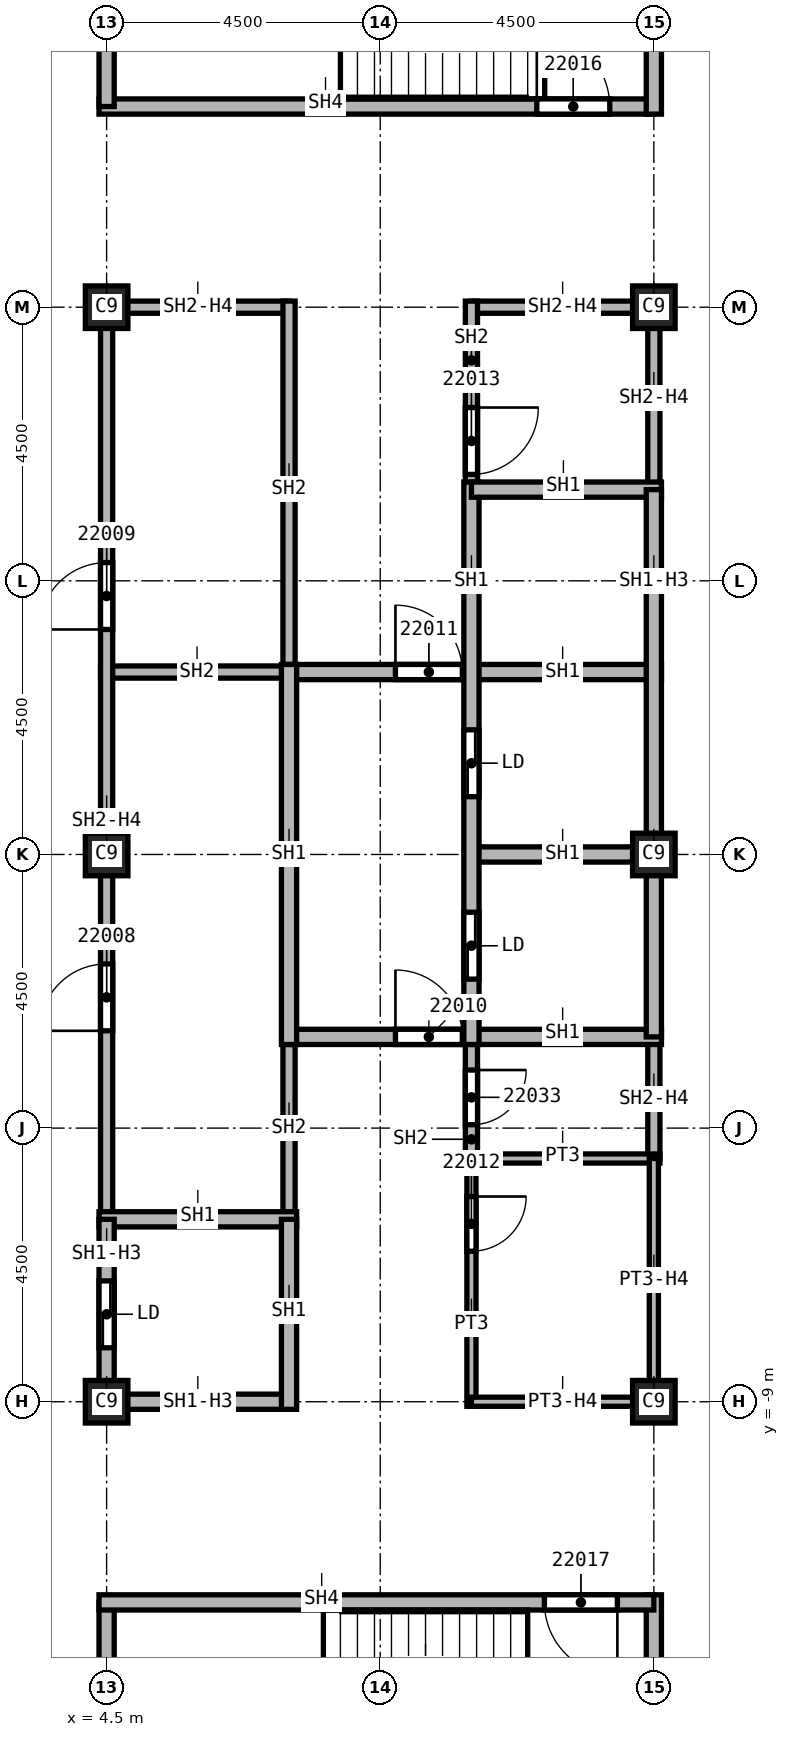
"""IFC4 building model, lengths in metres.
Left out: names, types, materials, properties, quantities, classifications, styles, units other than length and angle.
Written with IfcOpenShell. Run it as: python <this file> out.ifc"""

import sys

from ifc_helpers import new_model, si_unit, direction, frame, frame_2d, origin, origin_2d, place, context, subcontext, project, spatial, rectangle, extrude, element, fill, save


model = new_model("IFC4")
c1 = context("Model", 3, precision=1e-05, world=origin(), true_north=direction((0.0, 1.0)))
c2 = subcontext(c1, "Body", "Model", "MODEL_VIEW")
j1 = project(units=[si_unit("LENGTHUNIT", "METRE"), si_unit("PLANEANGLEUNIT", "RADIAN")], contexts=[c1])
p1 = place(None, origin())
s1 = spatial("IfcSite", under=j1, at=p1, CompositionType="ELEMENT")
p2 = place(p1, origin())
s2 = spatial("IfcBuilding", under=s1, at=p2, CompositionType="ELEMENT")
p3 = place(p2, frame((0.0, 0.0, 312.0)))
s3 = spatial("IfcBuildingStorey", under=s2, at=p3, CompositionType="ELEMENT", Elevation=312.0)
for number, where, z_axis, x_axis in (
    (1, (4.5, 0.0, 0.0), (0.0, 0.0, 1.0), (1.0, 0.0, 0.0)),
    (2, (4.5, 9.0, 0.0), (0.0, 0.0, 1.0), (1.0, 0.0, 0.0)),
    (3, (4.5, -9.0, 0.0), (0.0, 0.0, 1.0), (1.0, 0.0, 0.0)),
    (4, (13.5, 0.0, 0.0), (0.0, 0.0, 1.0), (1.0, 0.0, 0.0)),
    (5, (13.5, 9.0, 0.0), (0.0, 0.0, 1.0), (1.0, 0.0, 0.0)),
    (6, (13.5, -9.0, 0.0), (0.0, 0.0, 1.0), (1.0, 0.0, 0.0)),
):
    element("IfcColumn", number, at=place(p3, frame(where, z_axis=z_axis, x_axis=x_axis)), inside=s3, PredefinedType="COLUMN", context=c2, shape_type="SweptSolid", body=[
        extrude(rectangle(XDim=0.7, YDim=0.7, at=origin_2d()), origin(), (0.0, 0.0, 1.0), 3.74),
    ])
p4 = place(p3, frame((4.4, 3.0, 0.0), z_axis=(0.0, 0.0, 1.0), x_axis=(1.0, 0.0, 0.0)))
e7 = element("IfcWall", 7, at=p4, inside=s3, PredefinedType="SOLIDWALL", context=c2, shape_type="SweptSolid", body=[
    extrude(rectangle(XDim=3.225, YDim=0.2, at=frame_2d((1.613, 0.0))), origin(), (0.0, 0.0, 1.0), 3.74),
])
p5 = place(p3, frame((4.5, -6.0, 0.0), z_axis=(0.0, 0.0, 1.0), x_axis=(0.0, 1.0, 0.0)))
e8 = element("IfcWall", 8, at=p5, inside=s3, PredefinedType="SOLIDWALL", context=c2, shape_type="SweptSolid", body=[
    extrude(rectangle(XDim=15.1, YDim=0.2, at=frame_2d((7.55, 0.0))), origin(), (0.0, 0.0, 1.0), 3.062),
])
p6 = place(p5, frame((3.1, 0.0, 0.0)))
e9 = element("IfcOpeningElement", 9, at=p6, cuts=e8, PredefinedType="OPENING", context=c2, shape_type="SweptSolid", body=[
    extrude(rectangle(XDim=1.1, YDim=2.1, at=frame_2d((0.55, 1.05))), frame((0.0, 0.1, 0.0), z_axis=(0.0, -1.0, 0.0), x_axis=(1.0, 0.0, 0.0)), (0.0, 0.0, 1.0), 0.2),
])
p7 = place(p5, frame((9.7, 0.0, 0.0)))
e10 = element("IfcOpeningElement", 10, at=p7, cuts=e8, PredefinedType="OPENING", context=c2, shape_type="SweptSolid", body=[
    extrude(rectangle(XDim=1.1, YDim=2.1, at=frame_2d((0.55, 1.05))), frame((0.0, 0.1, 0.0), z_axis=(0.0, -1.0, 0.0), x_axis=(1.0, 0.0, 0.0)), (0.0, 0.0, 1.0), 0.2),
])
p8 = place(p3, frame((4.5, 9.0, 0.0), z_axis=(0.0, 0.0, 1.0), x_axis=(1.0, 0.0, 0.0)))
e11 = element("IfcWall", 11, at=p8, inside=s3, PredefinedType="SOLIDWALL", context=c2, shape_type="SweptSolid", body=[
    extrude(rectangle(XDim=3.0, YDim=0.2, at=frame_2d((1.5, 0.0))), origin(), (0.0, 0.0, 1.0), 3.062),
])
p9 = place(p3, frame((7.5, -2.875, 0.0), z_axis=(0.0, 0.0, 1.0), x_axis=(0.0, -1.0, 0.0)))
e12 = element("IfcWall", 12, at=p9, inside=s3, PredefinedType="SOLIDWALL", context=c2, shape_type="SweptSolid", body=[
    extrude(rectangle(XDim=3.125, YDim=0.2, at=frame_2d((1.562, 0.0))), origin(), (0.0, 0.0, 1.0), 3.74),
])
p10 = place(p3, frame((7.5, 9.1, 0.0), z_axis=(0.0, 0.0, 1.0), x_axis=(0.0, -1.0, 0.0)))
e13 = element("IfcWall", 13, at=p10, inside=s3, PredefinedType="SOLIDWALL", context=c2, shape_type="SweptSolid", body=[
    extrude(rectangle(XDim=6.225, YDim=0.2, at=frame_2d((3.113, 0.0))), origin(), (0.0, 0.0, 1.0), 3.74),
])
p11 = place(p3, frame((10.5, -2.875, 0.0), z_axis=(0.0, 0.0, 1.0), x_axis=(0.0, -1.0, 0.0)))
e14 = element("IfcWall", 14, at=p11, inside=s3, PredefinedType="SOLIDWALL", context=c2, shape_type="SweptSolid", body=[
    extrude(rectangle(XDim=2.2, YDim=0.2, at=frame_2d((1.1, 0.0))), origin(), (0.0, 0.0, 1.0), 3.74),
])
p12 = place(p11, frame((0.67, 0.0, 0.0)))
e15 = element("IfcOpeningElement", 15, at=p12, cuts=e14, PredefinedType="OPENING", context=c2, shape_type="SweptSolid", body=[
    extrude(rectangle(XDim=0.9, YDim=2.1, at=frame_2d((0.45, 1.05))), frame((0.0, 0.1, 0.0), z_axis=(0.0, -1.0, 0.0), x_axis=(1.0, 0.0, 0.0)), (0.0, 0.0, 1.0), 0.2),
])
p13 = place(p3, frame((10.5, 9.0, 0.0), z_axis=(0.0, 0.0, 1.0), x_axis=(1.0, 0.0, 0.0)))
e16 = element("IfcWall", 16, at=p13, inside=s3, PredefinedType="SOLIDWALL", context=c2, shape_type="SweptSolid", body=[
    extrude(rectangle(XDim=3.0, YDim=0.2, at=frame_2d((1.5, 0.0))), origin(), (0.0, 0.0, 1.0), 3.062),
])
p14 = place(p3, frame((10.5, 9.1, 0.0), z_axis=(0.0, 0.0, 1.0), x_axis=(0.0, -1.0, 0.0)))
e17 = element("IfcWall", 17, at=p14, inside=s3, PredefinedType="SOLIDWALL", context=c2, shape_type="SweptSolid", body=[
    extrude(rectangle(XDim=3.225, YDim=0.2, at=frame_2d((1.613, 0.0))), origin(), (0.0, 0.0, 1.0), 3.74),
])
p15 = place(p14, frame((1.75, 0.0, 0.0)))
e18 = element("IfcOpeningElement", 18, at=p15, cuts=e17, PredefinedType="OPENING", context=c2, shape_type="SweptSolid", body=[
    extrude(rectangle(XDim=1.1, YDim=2.1, at=frame_2d((0.55, 1.05))), frame((0.0, 0.1, 0.0), z_axis=(0.0, -1.0, 0.0), x_axis=(1.0, 0.0, 0.0)), (0.0, 0.0, 1.0), 0.2),
])
p16 = place(p3, frame((13.5, -3.0, 0.0), z_axis=(0.0, 0.0, 1.0), x_axis=(0.0, -1.0, 0.0)))
e19 = element("IfcWall", 19, at=p16, inside=s3, PredefinedType="SOLIDWALL", context=c2, shape_type="SweptSolid", body=[
    extrude(rectangle(XDim=2.0, YDim=0.2, at=frame_2d((1.0, 0.0))), origin(), (0.0, 0.0, 1.0), 3.062),
])
p17 = place(p3, frame((13.5, 9.1, 0.0), z_axis=(0.0, 0.0, 1.0), x_axis=(0.0, -1.0, 0.0)))
e20 = element("IfcWall", 20, at=p17, inside=s3, PredefinedType="SOLIDWALL", context=c2, shape_type="SweptSolid", body=[
    extrude(rectangle(XDim=3.1, YDim=0.2, at=frame_2d((1.55, 0.0))), origin(), (0.0, 0.0, 1.0), 3.062),
])
p18 = place(p3, frame((4.375, -6.0, 0.0), z_axis=(0.0, 0.0, 1.0), x_axis=(1.0, 0.0, 0.0)))
e21 = element("IfcWall", 21, at=p18, inside=s3, PredefinedType="SOLIDWALL", context=c2, shape_type="SweptSolid", body=[
    extrude(rectangle(XDim=3.25, YDim=0.25, at=frame_2d((1.625, 0.0))), origin(), (0.0, 0.0, 1.0), 3.74),
])
p19 = place(p3, frame((4.5, -9.125, 0.0), z_axis=(0.0, 0.0, 1.0), x_axis=(0.0, 1.0, 0.0)))
e22 = element("IfcWall", 22, at=p19, inside=s3, PredefinedType="SOLIDWALL", context=c2, shape_type="SweptSolid", body=[
    extrude(rectangle(XDim=3.125, YDim=0.25, at=frame_2d((1.562, 0.0))), origin(), (0.0, 0.0, 1.0), 3.062),
])
p20 = place(p19, frame((1.012, 0.0, 0.0)))
e23 = element("IfcOpeningElement", 23, at=p20, cuts=e22, PredefinedType="OPENING", context=c2, shape_type="SweptSolid", body=[
    extrude(rectangle(XDim=1.1, YDim=2.1, at=frame_2d((0.55, 1.05))), frame((0.0, 0.125, 0.0), z_axis=(0.0, -1.0, 0.0), x_axis=(1.0, 0.0, 0.0)), (0.0, 0.0, 1.0), 0.25),
])
p21 = place(p3, frame((7.5, -9.0, 0.0), z_axis=(0.0, 0.0, 1.0), x_axis=(-1.0, 0.0, 0.0)))
e24 = element("IfcWall", 24, at=p21, inside=s3, PredefinedType="SOLIDWALL", context=c2, shape_type="SweptSolid", body=[
    extrude(rectangle(XDim=3.0, YDim=0.25, at=frame_2d((1.5, 0.0))), origin(), (0.0, 0.0, 1.0), 3.062),
])
p22 = place(p3, frame((7.5, -6.0, 0.0), z_axis=(0.0, 0.0, 1.0), x_axis=(0.0, -1.0, 0.0)))
e25 = element("IfcWall", 25, at=p22, inside=s3, PredefinedType="SOLIDWALL", context=c2, shape_type="SweptSolid", body=[
    extrude(rectangle(XDim=3.125, YDim=0.25, at=frame_2d((1.562, 0.0))), origin(), (0.0, 0.0, 1.0), 3.74),
])
p23 = place(p3, frame((7.5, -3.0, 0.0), z_axis=(0.0, 0.0, 1.0), x_axis=(1.0, 0.0, 0.0)))
e26 = element("IfcWall", 26, at=p23, inside=s3, PredefinedType="SOLIDWALL", context=c2, shape_type="SweptSolid", body=[
    extrude(rectangle(XDim=6.125, YDim=0.25, at=frame_2d((3.062, 0.0))), origin(), (0.0, 0.0, 1.0), 3.74),
])
p24 = place(p23, frame((1.75, 0.0, 0.0)))
e27 = element("IfcOpeningElement", 27, at=p24, cuts=e26, PredefinedType="OPENING", context=c2, shape_type="SweptSolid", body=[
    extrude(rectangle(XDim=1.1, YDim=2.1, at=frame_2d((0.55, 1.05))), frame((0.0, 0.125, 0.0), z_axis=(0.0, -1.0, 0.0), x_axis=(1.0, 0.0, 0.0)), (0.0, 0.0, 1.0), 0.25),
])
p25 = place(p3, frame((7.5, 3.0, 0.0), z_axis=(0.0, 0.0, 1.0), x_axis=(1.0, 0.0, 0.0)))
e28 = element("IfcWall", 28, at=p25, inside=s3, PredefinedType="SOLIDWALL", context=c2, shape_type="SweptSolid", body=[
    extrude(rectangle(XDim=6.125, YDim=0.25, at=frame_2d((3.062, 0.0))), origin(), (0.0, 0.0, 1.0), 3.74),
])
p26 = place(p25, frame((1.75, 0.0, 0.0)))
e29 = element("IfcOpeningElement", 29, at=p26, cuts=e28, PredefinedType="OPENING", context=c2, shape_type="SweptSolid", body=[
    extrude(rectangle(XDim=1.1, YDim=2.1, at=frame_2d((0.55, 1.05))), frame((0.0, 0.125, 0.0), z_axis=(0.0, -1.0, 0.0), x_axis=(1.0, 0.0, 0.0)), (0.0, 0.0, 1.0), 0.25),
])
p27 = place(p3, frame((7.5, 3.125, 0.0), z_axis=(0.0, 0.0, 1.0), x_axis=(0.0, -1.0, 0.0)))
e30 = element("IfcWall", 30, at=p27, inside=s3, PredefinedType="SOLIDWALL", context=c2, shape_type="SweptSolid", body=[
    extrude(rectangle(XDim=6.25, YDim=0.25, at=frame_2d((3.125, 0.0))), origin(), (0.0, 0.0, 1.0), 3.74),
])
p28 = place(p3, frame((10.5, 0.0, 0.0), z_axis=(0.0, 0.0, 1.0), x_axis=(1.0, 0.0, 0.0)))
e31 = element("IfcWall", 31, at=p28, inside=s3, PredefinedType="SOLIDWALL", context=c2, shape_type="SweptSolid", body=[
    extrude(rectangle(XDim=3.125, YDim=0.25, at=frame_2d((1.562, 0.0))), origin(), (0.0, 0.0, 1.0), 3.74),
])
p29 = place(p3, frame((10.5, 6.125, 0.0), z_axis=(0.0, 0.0, 1.0), x_axis=(0.0, -1.0, 0.0)))
e32 = element("IfcWall", 32, at=p29, inside=s3, PredefinedType="SOLIDWALL", context=c2, shape_type="SweptSolid", body=[
    extrude(rectangle(XDim=9.25, YDim=0.25, at=frame_2d((4.625, 0.0))), origin(), (0.0, 0.0, 1.0), 3.74),
])
p30 = place(p29, frame((7.075, 0.0, 0.0)))
e33 = element("IfcOpeningElement", 33, at=p30, cuts=e32, PredefinedType="OPENING", context=c2, shape_type="SweptSolid", body=[
    extrude(rectangle(XDim=1.1, YDim=2.1, at=frame_2d((0.55, 1.05))), frame((0.0, 0.125, 0.0), z_axis=(0.0, -1.0, 0.0), x_axis=(1.0, 0.0, 0.0)), (0.0, 0.0, 1.0), 0.25),
])
p31 = place(p29, frame((4.075, 0.0, 0.0)))
e34 = element("IfcOpeningElement", 34, at=p31, cuts=e32, PredefinedType="OPENING", context=c2, shape_type="SweptSolid", body=[
    extrude(rectangle(XDim=1.1, YDim=2.1, at=frame_2d((0.55, 1.05))), frame((0.0, 0.125, 0.0), z_axis=(0.0, -1.0, 0.0), x_axis=(1.0, 0.0, 0.0)), (0.0, 0.0, 1.0), 0.25),
])
p32 = place(p3, frame((10.5, 6.0, 0.0), z_axis=(0.0, 0.0, 1.0), x_axis=(1.0, 0.0, 0.0)))
e35 = element("IfcWall", 35, at=p32, inside=s3, PredefinedType="SOLIDWALL", context=c2, shape_type="SweptSolid", body=[
    extrude(rectangle(XDim=3.125, YDim=0.25, at=frame_2d((1.562, 0.0))), origin(), (0.0, 0.0, 1.0), 3.74),
])
p33 = place(p3, frame((13.5, 6.0, 0.0), z_axis=(0.0, 0.0, 1.0), x_axis=(0.0, -1.0, 0.0)))
e36 = element("IfcWall", 36, at=p33, inside=s3, PredefinedType="SOLIDWALL", context=c2, shape_type="SweptSolid", body=[
    extrude(rectangle(XDim=9.0, YDim=0.25, at=frame_2d((4.5, 0.0))), origin(), (0.0, 0.0, 1.0), 3.062),
])
p34 = place(p3, frame((4.375, 12.3, 0.0), z_axis=(0.0, 0.0, 1.0), x_axis=(1.0, 0.0, 0.0)))
e37 = element("IfcWall", 37, at=p34, inside=s3, PredefinedType="SOLIDWALL", context=c2, shape_type="SweptSolid", body=[
    extrude(rectangle(XDim=9.125, YDim=0.25, at=frame_2d((4.562, 0.0))), origin(), (0.0, 0.0, 1.0), 3.74),
])
p35 = place(p34, frame((7.2, 0.0, 0.0)))
e38 = element("IfcOpeningElement", 38, at=p35, cuts=e37, PredefinedType="OPENING", context=c2, shape_type="SweptSolid", body=[
    extrude(rectangle(XDim=1.2, YDim=2.1, at=frame_2d((0.6, 1.05))), frame((0.0, 0.125, 0.0), z_axis=(0.0, -1.0, 0.0), x_axis=(1.0, 0.0, 0.0)), (0.0, 0.0, 1.0), 0.25),
])
for number, where, z_axis, x_axis in (
    (39, (4.5, -16.8, 0.0), (0.0, 0.0, 1.0), (0.0, 1.0, 0.0)),
    (40, (4.5, 12.3, 0.0), (0.0, 0.0, 1.0), (0.0, 1.0, 0.0)),
):
    element("IfcWall", number, at=place(p3, frame(where, z_axis=z_axis, x_axis=x_axis)), inside=s3, PredefinedType="SOLIDWALL", context=c2, shape_type="SweptSolid", body=[
        extrude(rectangle(XDim=4.5, YDim=0.25, at=frame_2d((2.25, 0.0))), origin(), (0.0, 0.0, 1.0), 3.74),
    ])
p36 = place(p3, frame((13.5, -16.925, 0.0), z_axis=(0.0, 0.0, 1.0), x_axis=(0.0, 1.0, 0.0)))
e41 = element("IfcWall", 41, at=p36, inside=s3, PredefinedType="SOLIDWALL", context=c2, shape_type="SweptSolid", body=[
    extrude(rectangle(XDim=4.75, YDim=0.25, at=frame_2d((2.375, 0.0))), origin(), (0.0, 0.0, 1.0), 3.74),
])
p37 = place(p3, frame((13.5, -12.3, 0.0), z_axis=(0.0, 0.0, 1.0), x_axis=(-1.0, 0.0, 0.0)))
e42 = element("IfcWall", 42, at=p37, inside=s3, PredefinedType="SOLIDWALL", context=c2, shape_type="SweptSolid", body=[
    extrude(rectangle(XDim=9.125, YDim=0.25, at=frame_2d((4.562, 0.0))), origin(), (0.0, 0.0, 1.0), 3.74),
])
p38 = place(p37, frame((0.6, 0.0, 0.0)))
e43 = element("IfcOpeningElement", 43, at=p38, cuts=e42, PredefinedType="OPENING", context=c2, shape_type="SweptSolid", body=[
    extrude(rectangle(XDim=1.2, YDim=2.1, at=frame_2d((0.6, 1.05))), frame((0.0, 0.125, 0.0), z_axis=(0.0, -1.0, 0.0), x_axis=(1.0, 0.0, 0.0)), (0.0, 0.0, 1.0), 0.25),
])
p39 = place(p3, frame((13.5, 12.175, 0.0), z_axis=(0.0, 0.0, 1.0), x_axis=(0.0, 1.0, 0.0)))
e44 = element("IfcWall", 44, at=p39, inside=s3, PredefinedType="SOLIDWALL", context=c2, shape_type="SweptSolid", body=[
    extrude(rectangle(XDim=4.75, YDim=0.25, at=frame_2d((2.375, 0.0))), origin(), (0.0, 0.0, 1.0), 3.74),
])
p40 = place(p3, frame((10.5, -5.0, 0.0), z_axis=(0.0, 0.0, 1.0), x_axis=(1.0, 0.0, 0.0)))
e45 = element("IfcWall", 45, at=p40, inside=s3, PredefinedType="PARTITIONING", context=c2, shape_type="SweptSolid", body=[
    extrude(rectangle(XDim=3.1, YDim=0.15, at=frame_2d((1.55, 0.0))), origin(), (0.0, 0.0, 1.0), 3.74),
])
p41 = place(p3, frame((10.5, -4.925, 0.0), z_axis=(0.0, 0.0, 1.0), x_axis=(0.0, -1.0, 0.0)))
e46 = element("IfcWall", 46, at=p41, inside=s3, PredefinedType="PARTITIONING", context=c2, shape_type="SweptSolid", body=[
    extrude(rectangle(XDim=4.15, YDim=0.15, at=frame_2d((2.075, 0.0))), origin(), (0.0, 0.0, 1.0), 3.74),
])
p42 = place(p41, frame((0.7, 0.0, 0.0)))
e47 = element("IfcOpeningElement", 47, at=p42, cuts=e46, PredefinedType="OPENING", context=c2, shape_type="SweptSolid", body=[
    extrude(rectangle(XDim=0.9, YDim=2.1, at=frame_2d((0.45, 1.05))), frame((0.0, 0.075, 0.0), z_axis=(0.0, -1.0, 0.0), x_axis=(1.0, 0.0, 0.0)), (0.0, 0.0, 1.0), 0.15),
])
p43 = place(p3, frame((13.5, -9.0, 0.0), z_axis=(0.0, 0.0, 1.0), x_axis=(-1.0, 0.0, 0.0)))
e48 = element("IfcWall", 48, at=p43, inside=s3, PredefinedType="PARTITIONING", context=c2, shape_type="SweptSolid", body=[
    extrude(rectangle(XDim=3.0, YDim=0.15, at=frame_2d((1.5, 0.0))), origin(), (0.0, 0.0, 1.0), 3.062),
])
p44 = place(p3, frame((13.5, -5.0, 0.0), z_axis=(0.0, 0.0, 1.0), x_axis=(0.0, -1.0, 0.0)))
e49 = element("IfcWall", 49, at=p44, inside=s3, PredefinedType="PARTITIONING", context=c2, shape_type="SweptSolid", body=[
    extrude(rectangle(XDim=4.075, YDim=0.15, at=frame_2d((2.038, 0.0))), origin(), (0.0, 0.0, 1.0), 3.062),
])
p45 = place(p6, origin())
e50 = element("IfcDoor", 50, at=p45, inside=s3, OperationType="SINGLE_SWING_LEFT", PredefinedType="DOOR", context=c2, shape_type="SweptSolid", body=[
    extrude(rectangle(XDim=1.1, YDim=2.1, at=frame_2d((0.55, 1.05))), frame((0.0, 0.025, 0.0), z_axis=(0.0, -1.0, 0.0), x_axis=(1.0, 0.0, 0.0)), (0.0, 0.0, 1.0), 0.05),
])
fill(e9, e50)
p46 = place(p7, origin())
e51 = element("IfcDoor", 51, at=p46, inside=s3, OperationType="SINGLE_SWING_RIGHT", PredefinedType="DOOR", context=c2, shape_type="SweptSolid", body=[
    extrude(rectangle(XDim=1.1, YDim=2.1, at=frame_2d((0.55, 1.05))), frame((0.0, 0.025, 0.0), z_axis=(0.0, -1.0, 0.0), x_axis=(1.0, 0.0, 0.0)), (0.0, 0.0, 1.0), 0.05),
])
fill(e10, e51)
p47 = place(p24, origin())
e52 = element("IfcDoor", 52, at=p47, inside=s3, OperationType="SINGLE_SWING_LEFT", PredefinedType="DOOR", context=c2, shape_type="SweptSolid", body=[
    extrude(rectangle(XDim=1.1, YDim=2.1, at=frame_2d((0.55, 1.05))), frame((0.0, 0.025, 0.0), z_axis=(0.0, -1.0, 0.0), x_axis=(1.0, 0.0, 0.0)), (0.0, 0.0, 1.0), 0.05),
])
fill(e27, e52)
p48 = place(p26, origin())
e53 = element("IfcDoor", 53, at=p48, inside=s3, OperationType="SINGLE_SWING_RIGHT", PredefinedType="DOOR", context=c2, shape_type="SweptSolid", body=[
    extrude(rectangle(XDim=1.1, YDim=2.1, at=frame_2d((0.55, 1.05))), frame((0.0, 0.025, 0.0), z_axis=(0.0, -1.0, 0.0), x_axis=(1.0, 0.0, 0.0)), (0.0, 0.0, 1.0), 0.05),
])
fill(e29, e53)
p49 = place(p42, origin())
e54 = element("IfcDoor", 54, at=p49, inside=s3, OperationType="SINGLE_SWING_LEFT", PredefinedType="DOOR", context=c2, shape_type="SweptSolid", body=[
    extrude(rectangle(XDim=0.9, YDim=2.1, at=frame_2d((0.45, 1.05))), frame((0.0, 0.025, 0.0), z_axis=(0.0, -1.0, 0.0), x_axis=(1.0, 0.0, 0.0)), (0.0, 0.0, 1.0), 0.05),
])
fill(e47, e54)
p50 = place(p15, origin())
e55 = element("IfcDoor", 55, at=p50, inside=s3, OperationType="SINGLE_SWING_RIGHT", PredefinedType="DOOR", context=c2, shape_type="SweptSolid", body=[
    extrude(rectangle(XDim=1.1, YDim=2.1, at=frame_2d((0.55, 1.05))), frame((0.0, 0.025, 0.0), z_axis=(0.0, -1.0, 0.0), x_axis=(1.0, 0.0, 0.0)), (0.0, 0.0, 1.0), 0.05),
])
fill(e18, e55)
p51 = place(p35, origin())
e56 = element("IfcDoor", 56, at=p51, inside=s3, OperationType="SINGLE_SWING_LEFT", PredefinedType="DOOR", context=c2, shape_type="SweptSolid", body=[
    extrude(rectangle(XDim=1.2, YDim=2.1, at=frame_2d((0.6, 1.05))), frame((0.0, 0.025, 0.0), z_axis=(0.0, -1.0, 0.0), x_axis=(1.0, 0.0, 0.0)), (0.0, 0.0, 1.0), 0.05),
])
fill(e38, e56)
p52 = place(p38, origin())
e57 = element("IfcDoor", 57, at=p52, inside=s3, OperationType="SINGLE_SWING_RIGHT", PredefinedType="DOOR", context=c2, shape_type="SweptSolid", body=[
    extrude(rectangle(XDim=1.2, YDim=2.1, at=frame_2d((0.6, 1.05))), frame((0.0, 0.025, 0.0), z_axis=(0.0, -1.0, 0.0), x_axis=(1.0, 0.0, 0.0)), (0.0, 0.0, 1.0), 0.05),
])
fill(e43, e57)
p53 = place(p12, origin())
e58 = element("IfcDoor", 58, at=p53, inside=s3, OperationType="SINGLE_SWING_LEFT", PredefinedType="DOOR", context=c2, shape_type="SweptSolid", body=[
    extrude(rectangle(XDim=0.9, YDim=2.1, at=frame_2d((0.45, 1.05))), frame((0.0, 0.025, 0.0), z_axis=(0.0, -1.0, 0.0), x_axis=(1.0, 0.0, 0.0)), (0.0, 0.0, 1.0), 0.05),
])
fill(e15, e58)
p54 = place(p20, origin())
e59 = element("IfcDoor", 59, at=p54, inside=s3, OperationType="SLIDING_TO_LEFT", PredefinedType="DOOR", context=c2, shape_type="SweptSolid", body=[
    extrude(rectangle(XDim=1.1, YDim=2.1, at=frame_2d((0.55, 1.05))), frame((0.0, 0.025, 0.0), z_axis=(0.0, -1.0, 0.0), x_axis=(1.0, 0.0, 0.0)), (0.0, 0.0, 1.0), 0.05),
])
fill(e23, e59)
p55 = place(p30, origin())
e60 = element("IfcDoor", 60, at=p55, inside=s3, OperationType="SLIDING_TO_LEFT", PredefinedType="DOOR", context=c2, shape_type="SweptSolid", body=[
    extrude(rectangle(XDim=1.1, YDim=2.1, at=frame_2d((0.55, 1.05))), frame((0.0, 0.025, 0.0), z_axis=(0.0, -1.0, 0.0), x_axis=(1.0, 0.0, 0.0)), (0.0, 0.0, 1.0), 0.05),
])
fill(e33, e60)
p56 = place(p31, origin())
e61 = element("IfcDoor", 61, at=p56, inside=s3, OperationType="SLIDING_TO_LEFT", PredefinedType="DOOR", context=c2, shape_type="SweptSolid", body=[
    extrude(rectangle(XDim=1.1, YDim=2.1, at=frame_2d((0.55, 1.05))), frame((0.0, 0.025, 0.0), z_axis=(0.0, -1.0, 0.0), x_axis=(1.0, 0.0, 0.0)), (0.0, 0.0, 1.0), 0.05),
])
fill(e34, e61)
save(model, sys.argv[1])
